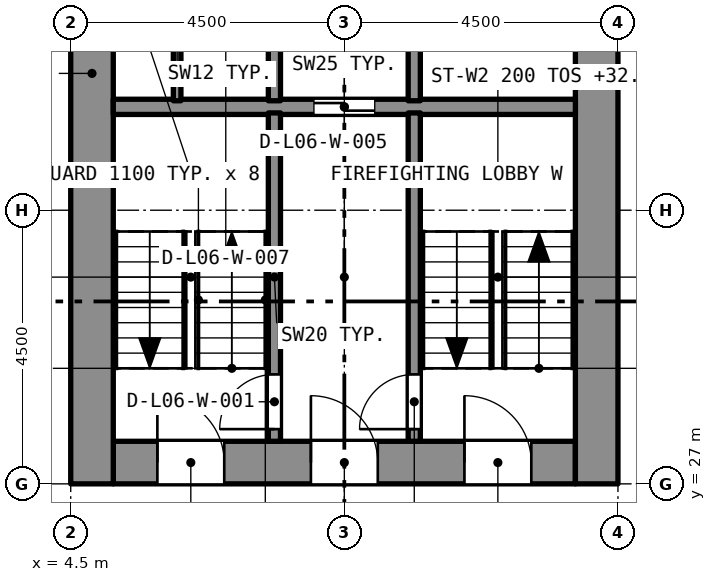
"""IFC4 building model, lengths in metres.
Left out: names, types, materials, properties, quantities, classifications, styles, units other than length and angle.
Written with IfcOpenShell. Run it as: python <this file> out.ifc"""

import sys

from ifc_helpers import new_model, si_unit, direction, frame, frame_2d, origin, place, context, subcontext, project, spatial, rectangle, extrude, element, fill, save


model = new_model("IFC4")
c1 = context("Model", 3, precision=1e-05, world=origin(), true_north=direction((0.0, 1.0)))
c2 = subcontext(c1, "Body", "Model", "MODEL_VIEW")
j1 = project(units=[si_unit("LENGTHUNIT", "METRE"), si_unit("PLANEANGLEUNIT", "RADIAN")], contexts=[c1])
p1 = place(None, origin())
s1 = spatial("IfcSite", under=j1, at=p1, CompositionType="ELEMENT")
p2 = place(p1, origin())
s2 = spatial("IfcBuilding", under=s1, at=p2, CompositionType="ELEMENT")
p3 = place(p2, frame((0.0, 0.0, 30.4)))
s3 = spatial("IfcBuildingStorey", under=s2, at=p3, CompositionType="ELEMENT", Elevation=30.4)
p4 = place(p3, frame((5.2, 27.35, 0.0), z_axis=(0.0, 0.0, 1.0), x_axis=(1.0, 0.0, 0.0)))
e1 = element("IfcWall", 1, at=p4, inside=s3, PredefinedType="SOLIDWALL", context=c2, shape_type="SweptSolid", body=[
    extrude(rectangle(XDim=7.6, YDim=0.7, at=frame_2d((3.8, 0.0))), origin(), (0.0, 0.0, 1.0), 3.2),
])
p5 = place(p4, frame((0.725, 0.0, 0.0)))
e2 = element("IfcOpeningElement", 2, at=p5, cuts=e1, PredefinedType="OPENING", context=c2, shape_type="SweptSolid", body=[
    extrude(rectangle(XDim=1.1, YDim=2.1, at=frame_2d((0.55, 1.05))), frame((0.0, 0.36, 0.0), z_axis=(0.0, -1.0, 0.0), x_axis=(1.0, 0.0, 0.0)), (0.0, 0.0, 1.0), 0.72),
])
p6 = place(p4, frame((3.25, 0.0, 0.0)))
e3 = element("IfcOpeningElement", 3, at=p6, cuts=e1, PredefinedType="OPENING", context=c2, shape_type="SweptSolid", body=[
    extrude(rectangle(XDim=1.1, YDim=2.1, at=frame_2d((0.55, 1.05))), frame((0.0, 0.36, 0.0), z_axis=(0.0, -1.0, 0.0), x_axis=(1.0, 0.0, 0.0)), (0.0, 0.0, 1.0), 0.72),
])
p7 = place(p4, frame((5.775, 0.0, 0.0)))
e4 = element("IfcOpeningElement", 4, at=p7, cuts=e1, PredefinedType="OPENING", context=c2, shape_type="SweptSolid", body=[
    extrude(rectangle(XDim=1.1, YDim=2.1, at=frame_2d((0.55, 1.05))), frame((0.0, 0.36, 0.0), z_axis=(0.0, -1.0, 0.0), x_axis=(1.0, 0.0, 0.0)), (0.0, 0.0, 1.0), 0.72),
])
p8 = place(p3, frame((4.85, 27.0, 0.0), z_axis=(0.0, 0.0, 1.0), x_axis=(0.0, 1.0, 0.0)))
e5 = element("IfcWall", 5, at=p8, inside=s3, PredefinedType="SOLIDWALL", context=c2, shape_type="SweptSolid", body=[
    extrude(rectangle(XDim=13.5, YDim=0.7, at=frame_2d((6.75, 0.0))), origin(), (0.0, 0.0, 1.0), 3.2),
])
p9 = place(p8, frame((8.95, 0.0, 0.0)))
e6 = element("IfcOpeningElement", 6, at=p9, cuts=e5, PredefinedType="OPENING", context=c2, shape_type="SweptSolid", body=[
    extrude(rectangle(XDim=1.2, YDim=2.1, at=frame_2d((0.6, 1.05))), frame((0.0, 0.36, 0.0), z_axis=(0.0, -1.0, 0.0), x_axis=(1.0, 0.0, 0.0)), (0.0, 0.0, 1.0), 0.72),
])
p10 = place(p3, frame((13.15, 27.0, 0.0), z_axis=(0.0, 0.0, 1.0), x_axis=(0.0, 1.0, 0.0)))
e7 = element("IfcWall", 7, at=p10, inside=s3, PredefinedType="SOLIDWALL", context=c2, shape_type="SweptSolid", body=[
    extrude(rectangle(XDim=13.5, YDim=0.7, at=frame_2d((6.75, 0.0))), origin(), (0.0, 0.0, 1.0), 3.2),
])
p11 = place(p10, frame((11.1, 0.0, 0.0)))
e8 = element("IfcOpeningElement", 8, at=p11, cuts=e7, PredefinedType="OPENING", context=c2, shape_type="SweptSolid", body=[
    extrude(rectangle(XDim=1.1, YDim=2.1, at=frame_2d((0.55, 1.05))), frame((0.0, 0.36, 0.0), z_axis=(0.0, -1.0, 0.0), x_axis=(1.0, 0.0, 0.0)), (0.0, 0.0, 1.0), 0.72),
])
p12 = place(p10, frame((8.95, 0.0, 0.0)))
e9 = element("IfcOpeningElement", 9, at=p12, cuts=e7, PredefinedType="OPENING", context=c2, shape_type="SweptSolid", body=[
    extrude(rectangle(XDim=1.2, YDim=2.1, at=frame_2d((0.6, 1.05))), frame((0.0, 0.36, 0.0), z_axis=(0.0, -1.0, 0.0), x_axis=(1.0, 0.0, 0.0)), (0.0, 0.0, 1.0), 0.72),
])
p13 = place(p3, frame((5.2, 33.2, 0.0), z_axis=(0.0, 0.0, 1.0), x_axis=(1.0, 0.0, 0.0)))
e10 = element("IfcWall", 10, at=p13, inside=s3, PredefinedType="SOLIDWALL", context=c2, shape_type="SweptSolid", body=[
    extrude(rectangle(XDim=7.6, YDim=0.25, at=frame_2d((3.8, 0.0))), origin(), (0.0, 0.0, 1.0), 2.9),
])
p14 = place(p13, frame((3.3, 0.0, 0.0)))
e11 = element("IfcOpeningElement", 11, at=p14, cuts=e10, PredefinedType="OPENING", context=c2, shape_type="SweptSolid", body=[
    extrude(rectangle(XDim=1.0, YDim=2.1, at=frame_2d((0.5, 1.05))), frame((0.0, 0.135, 0.0), z_axis=(0.0, -1.0, 0.0), x_axis=(1.0, 0.0, 0.0)), (0.0, 0.0, 1.0), 0.27),
])
p15 = place(p3, frame((7.85, 27.7, 0.0), z_axis=(0.0, 0.0, 1.0), x_axis=(0.0, 1.0, 0.0)))
e12 = element("IfcWall", 12, at=p15, inside=s3, PredefinedType="SOLIDWALL", context=c2, shape_type="SweptSolid", body=[
    extrude(rectangle(XDim=5.4, YDim=0.2, at=frame_2d((2.7, 0.0))), origin(), (0.0, 0.0, 1.0), 2.9),
])
p16 = place(p15, frame((0.2, 0.0, 0.0)))
e13 = element("IfcOpeningElement", 13, at=p16, cuts=e12, PredefinedType="OPENING", context=c2, shape_type="SweptSolid", body=[
    extrude(rectangle(XDim=0.9, YDim=2.1, at=frame_2d((0.45, 1.05))), frame((0.0, 0.11, 0.0), z_axis=(0.0, -1.0, 0.0), x_axis=(1.0, 0.0, 0.0)), (0.0, 0.0, 1.0), 0.22),
])
p17 = place(p3, frame((10.15, 27.7, 0.0), z_axis=(0.0, 0.0, 1.0), x_axis=(0.0, 1.0, 0.0)))
e14 = element("IfcWall", 14, at=p17, inside=s3, PredefinedType="SOLIDWALL", context=c2, shape_type="SweptSolid", body=[
    extrude(rectangle(XDim=5.4, YDim=0.2, at=frame_2d((2.7, 0.0))), origin(), (0.0, 0.0, 1.0), 2.9),
])
p18 = place(p17, frame((0.2, 0.0, 0.0)))
e15 = element("IfcOpeningElement", 15, at=p18, cuts=e14, PredefinedType="OPENING", context=c2, shape_type="SweptSolid", body=[
    extrude(rectangle(XDim=0.9, YDim=2.1, at=frame_2d((0.45, 1.05))), frame((0.0, 0.11, 0.0), z_axis=(0.0, -1.0, 0.0), x_axis=(1.0, 0.0, 0.0)), (0.0, 0.0, 1.0), 0.22),
])
for number, where, z_axis, x_axis in (
    (16, (7.85, 33.3, 0.0), (0.0, 0.0, 1.0), (0.0, 1.0, 0.0)),
    (17, (10.15, 33.3, 0.0), (0.0, 0.0, 1.0), (0.0, 1.0, 0.0)),
):
    element("IfcWall", number, at=place(p3, frame(where, z_axis=z_axis, x_axis=x_axis)), inside=s3, PredefinedType="SOLIDWALL", context=c2, shape_type="SweptSolid", body=[
        extrude(rectangle(XDim=2.3, YDim=0.2, at=frame_2d((1.15, 0.0))), origin(), (0.0, 0.0, 1.0), 2.9),
    ])
p19 = place(p3, frame((6.25, 33.3, 0.0), z_axis=(0.0, 0.0, 1.0), x_axis=(0.0, 1.0, 0.0)))
e18 = element("IfcWall", 18, at=p19, inside=s3, PredefinedType="PARTITIONING", context=c2, shape_type="SweptSolid", body=[
    extrude(rectangle(XDim=2.3, YDim=0.125, at=frame_2d((1.15, 0.0))), origin(), (0.0, 0.0, 1.0), 2.9),
])
p20 = place(p16, origin())
e19 = element("IfcDoor", 19, at=p20, inside=s3, OperationType="SINGLE_SWING_LEFT", PredefinedType="DOOR", context=c2, shape_type="SweptSolid", body=[
    extrude(rectangle(XDim=0.9, YDim=2.1, at=frame_2d((0.45, 1.05))), frame((0.0, 0.025, 0.0), z_axis=(0.0, -1.0, 0.0), x_axis=(1.0, 0.0, 0.0)), (0.0, 0.0, 1.0), 0.05),
])
fill(e13, e19)
p21 = place(p18, origin())
e20 = element("IfcDoor", 20, at=p21, inside=s3, OperationType="SINGLE_SWING_LEFT", PredefinedType="DOOR", context=c2, shape_type="SweptSolid", body=[
    extrude(rectangle(XDim=0.9, YDim=2.1, at=frame_2d((0.45, 1.05))), frame((0.0, 0.025, 0.0), z_axis=(0.0, -1.0, 0.0), x_axis=(1.0, 0.0, 0.0)), (0.0, 0.0, 1.0), 0.05),
])
fill(e15, e20)
p22 = place(p14, origin())
e21 = element("IfcDoor", 21, at=p22, inside=s3, OperationType="SLIDING_TO_LEFT", PredefinedType="DOOR", context=c2, shape_type="SweptSolid", body=[
    extrude(rectangle(XDim=1.0, YDim=2.1, at=frame_2d((0.5, 1.05))), frame((0.0, 0.025, 0.0), z_axis=(0.0, -1.0, 0.0), x_axis=(1.0, 0.0, 0.0)), (0.0, 0.0, 1.0), 0.05),
])
fill(e11, e21)
p23 = place(p5, origin())
e22 = element("IfcDoor", 22, at=p23, inside=s3, OperationType="SINGLE_SWING_LEFT", PredefinedType="DOOR", context=c2, shape_type="SweptSolid", body=[
    extrude(rectangle(XDim=1.1, YDim=2.1, at=frame_2d((0.55, 1.05))), frame((0.0, 0.025, 0.0), z_axis=(0.0, -1.0, 0.0), x_axis=(1.0, 0.0, 0.0)), (0.0, 0.0, 1.0), 0.05),
])
fill(e2, e22)
p24 = place(p6, origin())
e23 = element("IfcDoor", 23, at=p24, inside=s3, OperationType="SINGLE_SWING_LEFT", PredefinedType="DOOR", context=c2, shape_type="SweptSolid", body=[
    extrude(rectangle(XDim=1.1, YDim=2.1, at=frame_2d((0.55, 1.05))), frame((0.0, 0.025, 0.0), z_axis=(0.0, -1.0, 0.0), x_axis=(1.0, 0.0, 0.0)), (0.0, 0.0, 1.0), 0.05),
])
fill(e3, e23)
p25 = place(p7, origin())
e24 = element("IfcDoor", 24, at=p25, inside=s3, OperationType="SINGLE_SWING_LEFT", PredefinedType="DOOR", context=c2, shape_type="SweptSolid", body=[
    extrude(rectangle(XDim=1.1, YDim=2.1, at=frame_2d((0.55, 1.05))), frame((0.0, 0.025, 0.0), z_axis=(0.0, -1.0, 0.0), x_axis=(1.0, 0.0, 0.0)), (0.0, 0.0, 1.0), 0.05),
])
fill(e4, e24)
save(model, sys.argv[1])
